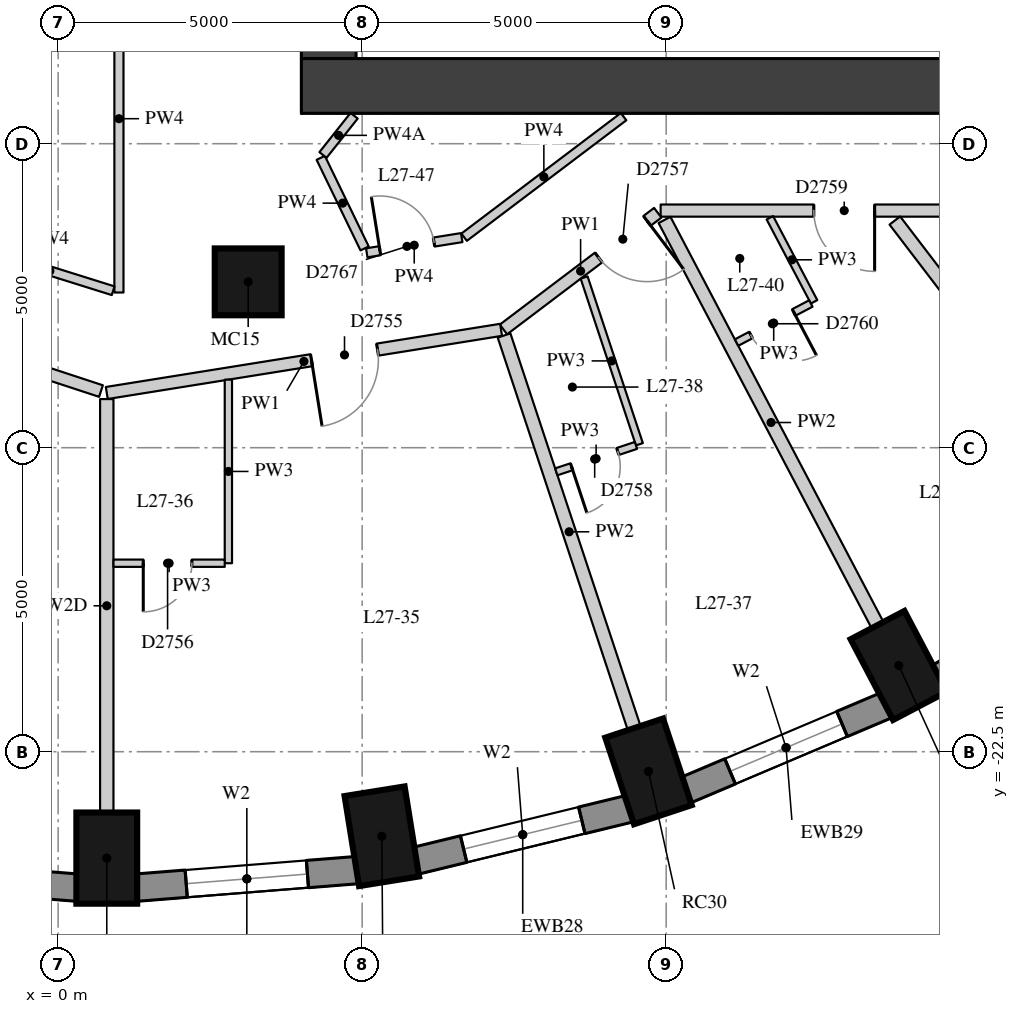
"""IFC4 building model, lengths in metres.
Left out: names, types, materials, properties, quantities, classifications, styles, units other than length and angle.
Written with IfcOpenShell. Run it as: python <this file> out.ifc"""

import sys

from ifc_helpers import new_model, si_unit, direction, frame, frame_2d, origin, origin_2d, place, context, subcontext, project, spatial, rectangle, extrude, element, fill, save


model = new_model("IFC4")
c1 = context("Model", 3, precision=1e-05, world=origin(), true_north=direction((0.0, 1.0)))
c2 = subcontext(c1, "Body", "Model", "MODEL_VIEW")
j1 = project(units=[si_unit("LENGTHUNIT", "METRE"), si_unit("PLANEANGLEUNIT", "RADIAN")], contexts=[c1])
p1 = place(None, origin())
s1 = spatial("IfcSite", under=j1, at=p1, CompositionType="ELEMENT")
p2 = place(p1, origin())
s2 = spatial("IfcBuilding", under=s1, at=p2, CompositionType="ELEMENT")
p3 = place(p2, frame((0.0, 0.0, 98.8)))
s3 = spatial("IfcBuildingStorey", under=s2, at=p3, CompositionType="ELEMENT", Elevation=98.8)
for number, where, z_axis, x_axis in (
    (1, (0.8, -24.25, 0.0), (0.0, 0.0, 1.0), (0.0, -1.0, 0.0)),
    (2, (5.323, -23.891, 0.0), (0.0, 0.0, 1.0), (0.159, -0.987, 0.0)),
    (3, (9.71, -22.824, 0.0), (0.0, 0.0, 1.0), (0.315, -0.949, 0.0)),
    (4, (13.825, -21.082, 0.0), (0.0, 0.0, 1.0), (0.465, -0.885, 0.0)),
):
    element("IfcColumn", number, at=place(p3, frame(where, z_axis=z_axis, x_axis=x_axis)), inside=s3, PredefinedType="COLUMN", context=c2, shape_type="SweptSolid", body=[
        extrude(rectangle(XDim=1.5, YDim=1.0, at=origin_2d()), origin(), (0.0, 0.0, 1.0), 3.3),
    ])
p4 = place(p3, frame((3.126, -14.772, 0.0), z_axis=(0.0, 0.0, 1.0), x_axis=(1.0, 0.0, 0.0)))
e5 = element("IfcColumn", 5, at=p4, inside=s3, PredefinedType="COLUMN", context=c2, shape_type="SweptSolid", body=[
    extrude(rectangle(XDim=1.1, YDim=1.1, at=origin_2d()), origin(), (0.0, 0.0, 1.0), 3.3),
])
p5 = place(p3, frame((-3.327, -24.447, 0.0), z_axis=(0.0, 0.0, 1.0), x_axis=(0.996862216754, -0.079156306178, 0.0)))
e6 = element("IfcWall", 6, at=p5, inside=s3, PredefinedType="SOLIDWALL", context=c2, shape_type="SweptSolid", body=[
    extrude(rectangle(XDim=3.658, YDim=0.45, at=frame_2d((1.829, 0.0))), origin(), (0.0, 0.0, 1.0), 3.02),
])
p6 = place(p5, frame((0.829, 0.0, 0.4)))
e7 = element("IfcOpeningElement", 7, at=p6, cuts=e6, PredefinedType="OPENING", context=c2, shape_type="SweptSolid", body=[
    extrude(rectangle(XDim=2.0, YDim=1.75, at=frame_2d((1.0, 0.875))), frame((0.0, 0.235, 0.0), z_axis=(0.0, -1.0, 0.0), x_axis=(1.0, 0.0, 0.0)), (0.0, 0.0, 1.0), 0.47),
])
p7 = place(p3, frame((1.28, -24.736, 0.0), z_axis=(0.0, 0.0, 1.0), x_axis=(0.996862216754, 0.079156306178, 0.0)))
e8 = element("IfcWall", 8, at=p7, inside=s3, PredefinedType="SOLIDWALL", context=c2, shape_type="SweptSolid", body=[
    extrude(rectangle(XDim=3.658, YDim=0.45, at=frame_2d((1.829, 0.0))), origin(), (0.0, 0.0, 1.0), 3.02),
])
p8 = place(p7, frame((0.829, 0.0, 0.4)))
e9 = element("IfcOpeningElement", 9, at=p8, cuts=e8, PredefinedType="OPENING", context=c2, shape_type="SweptSolid", body=[
    extrude(rectangle(XDim=2.0, YDim=1.75, at=frame_2d((1.0, 0.875))), frame((0.0, 0.235, 0.0), z_axis=(0.0, -1.0, 0.0), x_axis=(1.0, 0.0, 0.0)), (0.0, 0.0, 1.0), 0.47),
])
p9 = place(p3, frame((5.875, -24.294, 0.0), z_axis=(0.0, 0.0, 1.0), x_axis=(0.971667603162, 0.236351579148, 0.0)))
e10 = element("IfcWall", 10, at=p9, inside=s3, PredefinedType="SOLIDWALL", context=c2, shape_type="SweptSolid", body=[
    extrude(rectangle(XDim=3.635, YDim=0.45, at=frame_2d((1.817, 0.0))), origin(), (0.0, 0.0, 1.0), 3.02),
])
p10 = place(p9, frame((0.817, 0.0, 0.4)))
e11 = element("IfcOpeningElement", 11, at=p10, cuts=e10, PredefinedType="OPENING", context=c2, shape_type="SweptSolid", body=[
    extrude(rectangle(XDim=2.0, YDim=1.75, at=frame_2d((1.0, 0.875))), frame((0.0, 0.235, 0.0), z_axis=(0.0, -1.0, 0.0), x_axis=(1.0, 0.0, 0.0)), (0.0, 0.0, 1.0), 0.47),
])
p11 = place(p3, frame((10.318, -23.134, 0.0), z_axis=(0.0, 0.0, 1.0), x_axis=(0.920869643542, 0.389870619055, 0.0)))
e12 = element("IfcWall", 12, at=p11, inside=s3, PredefinedType="SOLIDWALL", context=c2, shape_type="SweptSolid", body=[
    extrude(rectangle(XDim=3.591, YDim=0.45, at=frame_2d((1.796, 0.0))), origin(), (0.0, 0.0, 1.0), 3.02),
])
p12 = place(p11, frame((0.796, 0.0, 0.4)))
e13 = element("IfcOpeningElement", 13, at=p12, cuts=e12, PredefinedType="OPENING", context=c2, shape_type="SweptSolid", body=[
    extrude(rectangle(XDim=2.0, YDim=1.75, at=frame_2d((1.0, 0.875))), frame((0.0, 0.235, 0.0), z_axis=(0.0, -1.0, 0.0), x_axis=(1.0, 0.0, 0.0)), (0.0, 0.0, 1.0), 0.47),
])
p13 = place(p3, frame((14.475, -21.287, 0.0), z_axis=(0.0, 0.0, 1.0), x_axis=(0.843911841423, 0.536481876587, 0.0)))
e14 = element("IfcWall", 14, at=p13, inside=s3, PredefinedType="SOLIDWALL", context=c2, shape_type="SweptSolid", body=[
    extrude(rectangle(XDim=3.532, YDim=0.45, at=frame_2d((1.766, 0.0))), origin(), (0.0, 0.0, 1.0), 3.02),
])
p14 = place(p13, frame((0.766, 0.0, 0.4)))
e15 = element("IfcOpeningElement", 15, at=p14, cuts=e14, PredefinedType="OPENING", context=c2, shape_type="SweptSolid", body=[
    extrude(rectangle(XDim=2.0, YDim=1.75, at=frame_2d((1.0, 0.875))), frame((0.0, 0.235, 0.0), z_axis=(0.0, -1.0, 0.0), x_axis=(1.0, 0.0, 0.0)), (0.0, 0.0, 1.0), 0.47),
])
p15 = place(p3, frame((4.45, -11.1, 0.0), z_axis=(0.0, 0.0, 1.0), x_axis=(0.0, 1.0, 0.0)))
e16 = element("IfcWall", 16, at=p15, inside=s3, PredefinedType="SHEAR", context=c2, shape_type="SweptSolid", body=[
    extrude(rectangle(XDim=22.2, YDim=0.9, at=frame_2d((11.1, 0.0))), origin(), (0.0, 0.0, 1.0), 3.02),
])
p16 = place(p15, frame((2.35, 0.0, 0.0)))
e17 = element("IfcOpeningElement", 17, at=p16, cuts=e16, PredefinedType="OPENING", context=c2, shape_type="SweptSolid", body=[
    extrude(rectangle(XDim=1.5, YDim=2.1, at=frame_2d((0.75, 1.05))), frame((0.0, 0.46, 0.0), z_axis=(0.0, -1.0, 0.0), x_axis=(1.0, 0.0, 0.0)), (0.0, 0.0, 1.0), 0.92),
])
p17 = place(p15, frame((5.45, 0.0, 0.0)))
e18 = element("IfcOpeningElement", 18, at=p17, cuts=e16, PredefinedType="OPENING", context=c2, shape_type="SweptSolid", body=[
    extrude(rectangle(XDim=1.8, YDim=2.1, at=frame_2d((0.9, 1.05))), frame((0.0, 0.46, 0.0), z_axis=(0.0, -1.0, 0.0), x_axis=(1.0, 0.0, 0.0)), (0.0, 0.0, 1.0), 0.92),
])
p18 = place(p15, frame((7.95, 0.0, 0.0)))
e19 = element("IfcOpeningElement", 19, at=p18, cuts=e16, PredefinedType="OPENING", context=c2, shape_type="SweptSolid", body=[
    extrude(rectangle(XDim=1.1, YDim=2.1, at=frame_2d((0.55, 1.05))), frame((0.0, 0.46, 0.0), z_axis=(0.0, -1.0, 0.0), x_axis=(1.0, 0.0, 0.0)), (0.0, 0.0, 1.0), 0.92),
])
p19 = place(p15, frame((10.6, 0.0, 0.0)))
e20 = element("IfcOpeningElement", 20, at=p19, cuts=e16, PredefinedType="OPENING", context=c2, shape_type="SweptSolid", body=[
    extrude(rectangle(XDim=1.0, YDim=2.1, at=frame_2d((0.5, 1.05))), frame((0.0, 0.46, 0.0), z_axis=(0.0, -1.0, 0.0), x_axis=(1.0, 0.0, 0.0)), (0.0, 0.0, 1.0), 0.92),
])
p20 = place(p15, frame((13.15, 0.0, 0.0)))
e21 = element("IfcOpeningElement", 21, at=p20, cuts=e16, PredefinedType="OPENING", context=c2, shape_type="SweptSolid", body=[
    extrude(rectangle(XDim=1.1, YDim=2.1, at=frame_2d((0.55, 1.05))), frame((0.0, 0.46, 0.0), z_axis=(0.0, -1.0, 0.0), x_axis=(1.0, 0.0, 0.0)), (0.0, 0.0, 1.0), 0.92),
])
p21 = place(p15, frame((14.95, 0.0, 0.0)))
e22 = element("IfcOpeningElement", 22, at=p21, cuts=e16, PredefinedType="OPENING", context=c2, shape_type="SweptSolid", body=[
    extrude(rectangle(XDim=1.8, YDim=2.1, at=frame_2d((0.9, 1.05))), frame((0.0, 0.46, 0.0), z_axis=(0.0, -1.0, 0.0), x_axis=(1.0, 0.0, 0.0)), (0.0, 0.0, 1.0), 0.92),
])
p22 = place(p15, frame((18.35, 0.0, 0.0)))
e23 = element("IfcOpeningElement", 23, at=p22, cuts=e16, PredefinedType="OPENING", context=c2, shape_type="SweptSolid", body=[
    extrude(rectangle(XDim=1.5, YDim=2.1, at=frame_2d((0.75, 1.05))), frame((0.0, 0.46, 0.0), z_axis=(0.0, -1.0, 0.0), x_axis=(1.0, 0.0, 0.0)), (0.0, 0.0, 1.0), 0.92),
])
p23 = place(p3, frame((4.0, -11.55, 0.0), z_axis=(0.0, 0.0, 1.0), x_axis=(1.0, 0.0, 0.0)))
e24 = element("IfcWall", 24, at=p23, inside=s3, PredefinedType="SHEAR", context=c2, shape_type="SweptSolid", body=[
    extrude(rectangle(XDim=15.2, YDim=0.9, at=frame_2d((7.6, 0.0))), origin(), (0.0, 0.0, 1.0), 3.02),
])
p24 = place(p3, frame((20.7, -13.6, 0.0), z_axis=(0.0, 0.0, 1.0), x_axis=(-1.0, 0.0, 0.0)))
e25 = element("IfcWall", 25, at=p24, inside=s3, PredefinedType="PARTITIONING", context=c2, shape_type="SweptSolid", body=[
    extrude(rectangle(XDim=10.791, YDim=0.2, at=frame_2d((5.396, 0.0))), origin(), (0.0, 0.0, 1.0), 3.02),
])
p25 = place(p24, frame((7.272, 0.0, 0.0)))
e26 = element("IfcOpeningElement", 26, at=p25, cuts=e25, PredefinedType="OPENING", context=c2, shape_type="SweptSolid", body=[
    extrude(rectangle(XDim=1.0, YDim=2.1, at=frame_2d((0.5, 1.05))), frame((0.0, 0.11, 0.0), z_axis=(0.0, -1.0, 0.0), x_axis=(1.0, 0.0, 0.0)), (0.0, 0.0, 1.0), 0.22),
])
p26 = place(p24, frame((2.638, 0.0, 0.0)))
e27 = element("IfcOpeningElement", 27, at=p26, cuts=e25, PredefinedType="OPENING", context=c2, shape_type="SweptSolid", body=[
    extrude(rectangle(XDim=1.8, YDim=2.1, at=frame_2d((0.9, 1.05))), frame((0.0, 0.11, 0.0), z_axis=(0.0, -1.0, 0.0), x_axis=(1.0, 0.0, 0.0)), (0.0, 0.0, 1.0), 0.22),
])
p27 = place(p3, frame((9.861, -13.636, 0.0), z_axis=(0.0, 0.0, 1.0), x_axis=(-0.797589990076, -0.603199973251, 0.0)))
e28 = element("IfcWall", 28, at=p27, inside=s3, PredefinedType="PARTITIONING", context=c2, shape_type="SweptSolid", body=[
    extrude(rectangle(XDim=3.181, YDim=0.2, at=frame_2d((1.591, 0.0))), origin(), (0.0, 0.0, 1.0), 3.02),
])
p28 = place(p27, frame((0.22, 0.0, 0.0)))
e29 = element("IfcOpeningElement", 29, at=p28, cuts=e28, PredefinedType="OPENING", context=c2, shape_type="SweptSolid", body=[
    extrude(rectangle(XDim=1.0, YDim=2.1, at=frame_2d((0.5, 1.05))), frame((0.0, 0.11, 0.0), z_axis=(0.0, -1.0, 0.0), x_axis=(1.0, 0.0, 0.0)), (0.0, 0.0, 1.0), 0.22),
])
p29 = place(p3, frame((7.284, -15.561, 0.0), z_axis=(0.0, 0.0, 1.0), x_axis=(-0.987409293733, -0.158186240393, 0.0)))
e30 = element("IfcWall", 30, at=p29, inside=s3, PredefinedType="PARTITIONING", context=c2, shape_type="SweptSolid", body=[
    extrude(rectangle(XDim=6.567, YDim=0.2, at=frame_2d((3.284, 0.0))), origin(), (0.0, 0.0, 1.0), 3.02),
])
p30 = place(p29, frame((2.057, 0.0, 0.0)))
e31 = element("IfcOpeningElement", 31, at=p30, cuts=e30, PredefinedType="OPENING", context=c2, shape_type="SweptSolid", body=[
    extrude(rectangle(XDim=1.1, YDim=2.1, at=frame_2d((0.55, 1.05))), frame((0.0, 0.11, 0.0), z_axis=(0.0, -1.0, 0.0), x_axis=(1.0, 0.0, 0.0)), (0.0, 0.0, 1.0), 0.22),
])
p31 = place(p3, frame((0.705, -16.568, 0.0), z_axis=(0.0, 0.0, 1.0), x_axis=(-0.950067715644, 0.312043804122, 0.0)))
e32 = element("IfcWall", 32, at=p31, inside=s3, PredefinedType="PARTITIONING", context=c2, shape_type="SweptSolid", body=[
    extrude(rectangle(XDim=9.057, YDim=0.2, at=frame_2d((4.528, 0.0))), origin(), (0.0, 0.0, 1.0), 2.57),
])
p32 = place(p31, frame((2.045, 0.0, 0.0)))
e33 = element("IfcOpeningElement", 33, at=p32, cuts=e32, PredefinedType="OPENING", context=c2, shape_type="SweptSolid", body=[
    extrude(rectangle(XDim=1.1, YDim=2.1, at=frame_2d((0.55, 1.05))), frame((0.0, 0.11, 0.0), z_axis=(0.0, -1.0, 0.0), x_axis=(1.0, 0.0, 0.0)), (0.0, 0.0, 1.0), 0.22),
])
p33 = place(p3, frame((1.0, -9.23, 0.0), z_axis=(0.0, 0.0, 1.0), x_axis=(0.0, -1.0, 0.0)))
e34 = element("IfcWall", 34, at=p33, inside=s3, PredefinedType="PARTITIONING", context=c2, shape_type="SweptSolid", body=[
    extrude(rectangle(XDim=5.718, YDim=0.15, at=frame_2d((2.859, 0.0))), origin(), (0.0, 0.0, 1.0), 3.02),
])
p34 = place(p3, frame((0.905, -14.918, 0.0), z_axis=(0.0, 0.0, 1.0), x_axis=(-0.954324426349, 0.298772303391, 0.0)))
e35 = element("IfcWall", 35, at=p34, inside=s3, PredefinedType="PARTITIONING", context=c2, shape_type="SweptSolid", body=[
    extrude(rectangle(XDim=2.18, YDim=0.15, at=frame_2d((1.09, 0.0))), origin(), (0.0, 0.0, 1.0), 3.02),
])
p35 = place(p3, frame((9.3, -12.055, 0.0), z_axis=(0.0, 0.0, 1.0), x_axis=(-0.79762360872, -0.603155517933, 0.0)))
e36 = element("IfcWall", 36, at=p35, inside=s3, PredefinedType="PARTITIONING", context=c2, shape_type="SweptSolid", body=[
    extrude(rectangle(XDim=3.288, YDim=0.15, at=frame_2d((1.644, 0.0))), origin(), (0.0, 0.0, 1.0), 3.02),
])
p36 = place(p3, frame((6.637, -14.044, 0.0), z_axis=(0.0, 0.0, 1.0), x_axis=(-0.987404968029, -0.158213239367, 0.0)))
e37 = element("IfcWall", 37, at=p36, inside=s3, PredefinedType="PARTITIONING", context=c2, shape_type="SweptSolid", body=[
    extrude(rectangle(XDim=1.582, YDim=0.15, at=frame_2d((0.791, 0.0))), origin(), (0.0, 0.0, 1.0), 3.02),
])
p37 = place(p36, frame((0.462, 0.0, 0.0)))
e38 = element("IfcOpeningElement", 38, at=p37, cuts=e37, PredefinedType="OPENING", context=c2, shape_type="SweptSolid", body=[
    extrude(rectangle(XDim=0.9, YDim=2.1, at=frame_2d((0.45, 1.05))), frame((0.0, 0.085, 0.0), z_axis=(0.0, -1.0, 0.0), x_axis=(1.0, 0.0, 0.0)), (0.0, 0.0, 1.0), 0.17),
])
p38 = place(p3, frame((5.041, -14.222, 0.0), z_axis=(0.0, 0.0, 1.0), x_axis=(-0.436031090703, 0.899931601812, 0.0)))
e39 = element("IfcWall", 39, at=p38, inside=s3, PredefinedType="PARTITIONING", context=c2, shape_type="SweptSolid", body=[
    extrude(rectangle(XDim=1.656, YDim=0.15, at=frame_2d((0.828, 0.0))), origin(), (0.0, 0.0, 1.0), 3.02),
])
p39 = place(p3, frame((4.356, -12.686, 0.0), z_axis=(0.0, 0.0, 1.0), x_axis=(0.621438600293, 0.783462868339, 0.0)))
e40 = element("IfcWall", 40, at=p39, inside=s3, PredefinedType="PARTITIONING", context=c2, shape_type="SweptSolid", body=[
    extrude(rectangle(XDim=0.824, YDim=0.15, at=frame_2d((0.412, 0.0))), origin(), (0.0, 0.0, 1.0), 2.57),
])
p40 = place(p3, frame((0.8, -23.5, 0.0), z_axis=(0.0, 0.0, 1.0), x_axis=(0.0, 1.0, 0.0)))
e41 = element("IfcWall", 41, at=p40, inside=s3, PredefinedType="PARTITIONING", context=c2, shape_type="SweptSolid", body=[
    extrude(rectangle(XDim=6.8, YDim=0.22, at=frame_2d((3.4, 0.0))), origin(), (0.0, 0.0, 1.0), 2.47),
])
p41 = place(p3, frame((9.474, -22.112, 0.0), z_axis=(0.0, 0.0, 1.0), x_axis=(-0.314536861663, 0.949245259485, 0.0)))
e42 = element("IfcWall", 42, at=p41, inside=s3, PredefinedType="PARTITIONING", context=c2, shape_type="SweptSolid", body=[
    extrude(rectangle(XDim=6.802, YDim=0.22, at=frame_2d((3.401, 0.0))), origin(), (0.0, 0.0, 1.0), 3.02),
])
p42 = place(p3, frame((13.476, -20.418, 0.0), z_axis=(0.0, 0.0, 1.0), x_axis=(-0.465332071749, 0.885136183308, 0.0)))
e43 = element("IfcWall", 43, at=p42, inside=s3, PredefinedType="PARTITIONING", context=c2, shape_type="SweptSolid", body=[
    extrude(rectangle(XDim=7.529, YDim=0.22, at=frame_2d((3.764, 0.0))), origin(), (0.0, 0.0, 1.0), 3.02),
])
p43 = place(p3, frame((17.089, -18.121, 0.0), z_axis=(0.0, 0.0, 1.0), x_axis=(-0.607064955951, 0.794652212767, 0.0)))
e44 = element("IfcWall", 44, at=p43, inside=s3, PredefinedType="PARTITIONING", context=c2, shape_type="SweptSolid", body=[
    extrude(rectangle(XDim=5.483, YDim=0.22, at=frame_2d((2.742, 0.0))), origin(), (0.0, 0.0, 1.0), 3.02),
])
p44 = place(p3, frame((2.8, -16.381, 0.0), z_axis=(0.0, 0.0, 1.0), x_axis=(0.0, -1.0, 0.0)))
e45 = element("IfcWall", 45, at=p44, inside=s3, PredefinedType="PARTITIONING", context=c2, shape_type="SweptSolid", body=[
    extrude(rectangle(XDim=3.019, YDim=0.12, at=frame_2d((1.51, 0.0))), origin(), (0.0, 0.0, 1.0), 3.02),
])
p45 = place(p3, frame((8.651, -14.701, 0.0), z_axis=(0.0, 0.0, 1.0), x_axis=(0.314630509088, -0.949214223846, 0.0)))
e46 = element("IfcWall", 46, at=p45, inside=s3, PredefinedType="PARTITIONING", context=c2, shape_type="SweptSolid", body=[
    extrude(rectangle(XDim=2.89, YDim=0.12, at=frame_2d((1.445, 0.0))), origin(), (0.0, 0.0, 1.0), 3.02),
])
p46 = place(p3, frame((11.705, -13.718, 0.0), z_axis=(0.0, 0.0, 1.0), x_axis=(0.465437210927, -0.885080901773, 0.0)))
e47 = element("IfcWall", 47, at=p46, inside=s3, PredefinedType="PARTITIONING", context=c2, shape_type="SweptSolid", body=[
    extrude(rectangle(XDim=1.562, YDim=0.12, at=frame_2d((0.781, 0.0))), origin(), (0.0, 0.0, 1.0), 3.02),
])
p47 = place(p3, frame((2.74, -19.4, 0.0), z_axis=(0.0, 0.0, 1.0), x_axis=(-1.0, 0.0, 0.0)))
e48 = element("IfcWall", 48, at=p47, inside=s3, PredefinedType="PARTITIONING", context=c2, shape_type="SweptSolid", body=[
    extrude(rectangle(XDim=1.83, YDim=0.12, at=frame_2d((0.915, 0.0))), origin(), (0.0, 0.0, 1.0), 3.02),
])
p48 = place(p47, frame((0.54, 0.0, 0.0)))
e49 = element("IfcOpeningElement", 49, at=p48, cuts=e48, PredefinedType="OPENING", context=c2, shape_type="SweptSolid", body=[
    extrude(rectangle(XDim=0.8, YDim=2.1, at=frame_2d((0.4, 1.05))), frame((0.0, 0.07, 0.0), z_axis=(0.0, -1.0, 0.0), x_axis=(1.0, 0.0, 0.0)), (0.0, 0.0, 1.0), 0.14),
])
p49 = place(p3, frame((9.503, -17.463, 0.0), z_axis=(0.0, 0.0, 1.0), x_axis=(-0.949247859497, -0.314529014943, 0.0)))
e50 = element("IfcWall", 50, at=p49, inside=s3, PredefinedType="PARTITIONING", context=c2, shape_type="SweptSolid", body=[
    extrude(rectangle(XDim=1.38, YDim=0.12, at=frame_2d((0.69, 0.0))), origin(), (0.0, 0.0, 1.0), 3.02),
])
p50 = place(p49, frame((0.315, 0.0, 0.0)))
e51 = element("IfcOpeningElement", 51, at=p50, cuts=e50, PredefinedType="OPENING", context=c2, shape_type="SweptSolid", body=[
    extrude(rectangle(XDim=0.8, YDim=2.1, at=frame_2d((0.4, 1.05))), frame((0.0, 0.07, 0.0), z_axis=(0.0, -1.0, 0.0), x_axis=(1.0, 0.0, 0.0)), (0.0, 0.0, 1.0), 0.14),
])
p51 = place(p3, frame((12.379, -15.128, 0.0), z_axis=(0.0, 0.0, 1.0), x_axis=(-0.885113826366, -0.465374595757, 0.0)))
e52 = element("IfcWall", 52, at=p51, inside=s3, PredefinedType="PARTITIONING", context=c2, shape_type="SweptSolid", body=[
    extrude(rectangle(XDim=1.38, YDim=0.12, at=frame_2d((0.69, 0.0))), origin(), (0.0, 0.0, 1.0), 3.02),
])
p52 = place(p51, frame((0.315, 0.0, 0.0)))
e53 = element("IfcOpeningElement", 53, at=p52, cuts=e52, PredefinedType="OPENING", context=c2, shape_type="SweptSolid", body=[
    extrude(rectangle(XDim=0.8, YDim=2.1, at=frame_2d((0.4, 1.05))), frame((0.0, 0.07, 0.0), z_axis=(0.0, -1.0, 0.0), x_axis=(1.0, 0.0, 0.0)), (0.0, 0.0, 1.0), 0.14),
])
p53 = place(p8, origin())
e54 = element("IfcWindow", 54, at=p53, inside=s3, PartitioningType="SINGLE_PANEL", PredefinedType="WINDOW", context=c2, shape_type="SweptSolid", body=[
    extrude(rectangle(XDim=2.0, YDim=1.75, at=frame_2d((1.0, 0.875))), frame((0.0, 0.035, 0.0), z_axis=(0.0, -1.0, 0.0), x_axis=(1.0, 0.0, 0.0)), (0.0, 0.0, 1.0), 0.06),
])
fill(e9, e54)
p54 = place(p10, origin())
e55 = element("IfcWindow", 55, at=p54, inside=s3, PartitioningType="SINGLE_PANEL", PredefinedType="WINDOW", context=c2, shape_type="SweptSolid", body=[
    extrude(rectangle(XDim=2.0, YDim=1.75, at=frame_2d((1.0, 0.875))), frame((0.0, 0.035, 0.0), z_axis=(0.0, -1.0, 0.0), x_axis=(1.0, 0.0, 0.0)), (0.0, 0.0, 1.0), 0.06),
])
fill(e11, e55)
p55 = place(p12, origin())
e56 = element("IfcWindow", 56, at=p55, inside=s3, PartitioningType="SINGLE_PANEL", PredefinedType="WINDOW", context=c2, shape_type="SweptSolid", body=[
    extrude(rectangle(XDim=2.0, YDim=1.75, at=frame_2d((1.0, 0.875))), frame((0.0, 0.035, 0.0), z_axis=(0.0, -1.0, 0.0), x_axis=(1.0, 0.0, 0.0)), (0.0, 0.0, 1.0), 0.06),
])
fill(e13, e56)
p56 = place(p30, origin())
e57 = element("IfcDoor", 57, at=p56, inside=s3, OperationType="SINGLE_SWING_RIGHT", PredefinedType="DOOR", context=c2, shape_type="SweptSolid", body=[
    extrude(rectangle(XDim=1.1, YDim=2.1, at=frame_2d((0.55, 1.05))), frame((0.0, 0.025, 0.0), z_axis=(0.0, -1.0, 0.0), x_axis=(1.0, 0.0, 0.0)), (0.0, 0.0, 1.0), 0.05),
])
fill(e31, e57)
p57 = place(p48, origin())
e58 = element("IfcDoor", 58, at=p57, inside=s3, OperationType="SINGLE_SWING_RIGHT", PredefinedType="DOOR", context=c2, shape_type="SweptSolid", body=[
    extrude(rectangle(XDim=0.8, YDim=2.1, at=frame_2d((0.4, 1.05))), frame((0.0, 0.025, 0.0), z_axis=(0.0, -1.0, 0.0), x_axis=(1.0, 0.0, 0.0)), (0.0, 0.0, 1.0), 0.05),
])
fill(e49, e58)
p58 = place(p28, origin())
e59 = element("IfcDoor", 59, at=p58, inside=s3, OperationType="SINGLE_SWING_LEFT", PredefinedType="DOOR", context=c2, shape_type="SweptSolid", body=[
    extrude(rectangle(XDim=1.0, YDim=2.1, at=frame_2d((0.5, 1.05))), frame((0.0, 0.025, 0.0), z_axis=(0.0, -1.0, 0.0), x_axis=(1.0, 0.0, 0.0)), (0.0, 0.0, 1.0), 0.05),
])
fill(e29, e59)
p59 = place(p50, origin())
e60 = element("IfcDoor", 60, at=p59, inside=s3, OperationType="SINGLE_SWING_RIGHT", PredefinedType="DOOR", context=c2, shape_type="SweptSolid", body=[
    extrude(rectangle(XDim=0.8, YDim=2.1, at=frame_2d((0.4, 1.05))), frame((0.0, 0.025, 0.0), z_axis=(0.0, -1.0, 0.0), x_axis=(1.0, 0.0, 0.0)), (0.0, 0.0, 1.0), 0.05),
])
fill(e51, e60)
p60 = place(p25, origin())
e61 = element("IfcDoor", 61, at=p60, inside=s3, OperationType="SINGLE_SWING_LEFT", PredefinedType="DOOR", context=c2, shape_type="SweptSolid", body=[
    extrude(rectangle(XDim=1.0, YDim=2.1, at=frame_2d((0.5, 1.05))), frame((0.0, 0.025, 0.0), z_axis=(0.0, -1.0, 0.0), x_axis=(1.0, 0.0, 0.0)), (0.0, 0.0, 1.0), 0.05),
])
fill(e26, e61)
p61 = place(p52, origin())
e62 = element("IfcDoor", 62, at=p61, inside=s3, OperationType="SINGLE_SWING_LEFT", PredefinedType="DOOR", context=c2, shape_type="SweptSolid", body=[
    extrude(rectangle(XDim=0.8, YDim=2.1, at=frame_2d((0.4, 1.05))), frame((0.0, 0.025, 0.0), z_axis=(0.0, -1.0, 0.0), x_axis=(1.0, 0.0, 0.0)), (0.0, 0.0, 1.0), 0.05),
])
fill(e53, e62)
p62 = place(p37, origin())
e63 = element("IfcDoor", 63, at=p62, inside=s3, OperationType="SINGLE_SWING_LEFT", PredefinedType="DOOR", context=c2, shape_type="SweptSolid", body=[
    extrude(rectangle(XDim=0.9, YDim=2.1, at=frame_2d((0.45, 1.05))), frame((0.0, 0.025, 0.0), z_axis=(0.0, -1.0, 0.0), x_axis=(1.0, 0.0, 0.0)), (0.0, 0.0, 1.0), 0.05),
])
fill(e38, e63)
save(model, sys.argv[1])
